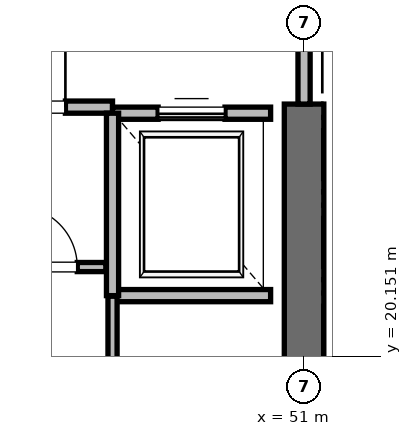
"""IFC4 building model, lengths in metres.
Left out: names, types, materials, properties, quantities, classifications, styles, units other than length and angle.
Written with IfcOpenShell. Run it as: python <this file> out.ifc"""

import sys

from ifc_helpers import new_model, si_unit, direction, frame, frame_2d, origin, place, context, subcontext, project, spatial, rectangle, extrude, element, fill, save


model = new_model("IFC4")
c1 = context("Model", 3, precision=1e-05, world=origin(), true_north=direction((0.0, 1.0)))
c2 = subcontext(c1, "Body", "Model", "MODEL_VIEW")
j1 = project(units=[si_unit("LENGTHUNIT", "METRE"), si_unit("PLANEANGLEUNIT", "RADIAN")], contexts=[c1])
p1 = place(None, origin())
s1 = spatial("IfcSite", under=j1, at=p1, CompositionType="ELEMENT")
p2 = place(p1, origin())
s2 = spatial("IfcBuilding", under=s1, at=p2, CompositionType="ELEMENT")
p3 = place(p2, frame((0.0, 0.0, 99.6)))
s3 = spatial("IfcBuildingStorey", under=s2, at=p3, CompositionType="ELEMENT", Elevation=99.6)
p4 = place(p3, frame((51.0, 18.5, 0.0), z_axis=(0.0, 0.0, 1.0), x_axis=(0.0, 1.0, 0.0)))
e1 = element("IfcWall", 1, at=p4, inside=s3, PredefinedType="SHEAR", context=c2, shape_type="SweptSolid", body=[
    extrude(rectangle(XDim=5.8, YDim=0.65, at=frame_2d((2.9, 0.0))), origin(), (0.0, 0.0, 1.0), 3.76),
])
p5 = place(p3, frame((45.15, 24.25, 0.0), z_axis=(0.0, 0.0, 1.0), x_axis=(1.0, 0.0, 0.0)))
e2 = element("IfcWall", 2, at=p5, inside=s3, PredefinedType="PARTITIONING", context=c2, shape_type="SweptSolid", body=[
    extrude(rectangle(XDim=2.7, YDim=0.2, at=frame_2d((1.35, 0.0))), origin(), (0.0, 0.0, 1.0), 3.76),
])
p6 = place(p5, frame((0.775, 0.0, 0.0)))
e3 = element("IfcOpeningElement", 3, at=p6, cuts=e2, PredefinedType="OPENING", context=c2, shape_type="SweptSolid", body=[
    extrude(rectangle(XDim=1.15, YDim=2.2, at=frame_2d((0.575, 1.1))), frame((0.0, 0.1, 0.0), z_axis=(0.0, -1.0, 0.0), x_axis=(1.0, 0.0, 0.0)), (0.0, 0.0, 1.0), 0.2),
])
p7 = place(p3, frame((51.0, 24.3, 0.0), z_axis=(0.0, 0.0, 1.0), x_axis=(0.0, 1.0, 0.0)))
e4 = element("IfcWall", 4, at=p7, inside=s3, PredefinedType="PARTITIONING", context=c2, shape_type="SweptSolid", body=[
    extrude(rectangle(XDim=3.4, YDim=0.2, at=frame_2d((1.7, 0.0))), origin(), (0.0, 0.0, 1.0), 2.54),
])
p8 = place(p7, frame((1.125, 0.0, 0.0)))
e5 = element("IfcOpeningElement", 5, at=p8, cuts=e4, PredefinedType="OPENING", context=c2, shape_type="SweptSolid", body=[
    extrude(rectangle(XDim=1.15, YDim=2.2, at=frame_2d((0.575, 1.1))), frame((0.0, 0.1, 0.0), z_axis=(0.0, -1.0, 0.0), x_axis=(1.0, 0.0, 0.0)), (0.0, 0.0, 1.0), 0.2),
])
p9 = place(p3, frame((47.85, 21.15, 0.0), z_axis=(0.0, 0.0, 1.0), x_axis=(1.0, 0.0, 0.0)))
e6 = element("IfcWall", 6, at=p9, inside=s3, PredefinedType="SOLIDWALL", context=c2, shape_type="SweptSolid", body=[
    extrude(rectangle(XDim=2.6, YDim=0.2, at=frame_2d((1.3, 0.0))), origin(), (0.0, 0.0, 1.0), 3.76),
])
p10 = place(p3, frame((50.45, 24.15, 0.0), z_axis=(0.0, 0.0, 1.0), x_axis=(-1.0, 0.0, 0.0)))
e7 = element("IfcWall", 7, at=p10, inside=s3, PredefinedType="SOLIDWALL", context=c2, shape_type="SweptSolid", body=[
    extrude(rectangle(XDim=2.6, YDim=0.2, at=frame_2d((1.3, 0.0))), origin(), (0.0, 0.0, 1.0), 2.54),
])
p11 = place(p10, frame((0.75, 0.0, 0.0)))
e8 = element("IfcOpeningElement", 8, at=p11, cuts=e7, PredefinedType="OPENING", context=c2, shape_type="SweptSolid", body=[
    extrude(rectangle(XDim=1.1, YDim=2.2, at=frame_2d((0.55, 1.1))), frame((0.0, 0.1, 0.0), z_axis=(0.0, -1.0, 0.0), x_axis=(1.0, 0.0, 0.0)), (0.0, 0.0, 1.0), 0.2),
])
p12 = place(p3, frame((47.85, 24.15, 0.0), z_axis=(0.0, 0.0, 1.0), x_axis=(0.0, -1.0, 0.0)))
e9 = element("IfcWall", 9, at=p12, inside=s3, PredefinedType="SOLIDWALL", context=c2, shape_type="SweptSolid", body=[
    extrude(rectangle(XDim=3.0, YDim=0.2, at=frame_2d((1.5, 0.0))), origin(), (0.0, 0.0, 1.0), 3.76),
])
p13 = place(p3, frame((47.85, 18.6, 0.0), z_axis=(0.0, 0.0, 1.0), x_axis=(0.0, 1.0, 0.0)))
e10 = element("IfcWall", 10, at=p13, inside=s3, PredefinedType="PARTITIONING", context=c2, shape_type="SweptSolid", body=[
    extrude(rectangle(XDim=2.54, YDim=0.15, at=frame_2d((1.27, 0.0))), origin(), (0.0, 0.0, 1.0), 2.85),
])
p14 = place(p3, frame((45.8, 21.62, 0.0), z_axis=(0.0, 0.0, 1.0), x_axis=(1.0, 0.0, 0.0)))
e11 = element("IfcWall", 11, at=p14, inside=s3, PredefinedType="PARTITIONING", context=c2, shape_type="SweptSolid", body=[
    extrude(rectangle(XDim=1.94, YDim=0.15, at=frame_2d((0.97, 0.0))), origin(), (0.0, 0.0, 1.0), 2.85),
])
p15 = place(p14, frame((0.47, 0.0, 0.0)))
e12 = element("IfcOpeningElement", 12, at=p15, cuts=e11, PredefinedType="OPENING", context=c2, shape_type="SweptSolid", body=[
    extrude(rectangle(XDim=1.0, YDim=2.15, at=frame_2d((0.5, 1.075))), frame((0.0, 0.075, 0.0), z_axis=(0.0, -1.0, 0.0), x_axis=(1.0, 0.0, 0.0)), (0.0, 0.0, 1.0), 0.15),
])
p16 = place(p6, origin())
e13 = element("IfcDoor", 13, at=p16, inside=s3, OperationType="SINGLE_SWING_RIGHT", PredefinedType="DOOR", context=c2, shape_type="SweptSolid", body=[
    extrude(rectangle(XDim=1.15, YDim=2.2, at=frame_2d((0.575, 1.1))), frame((0.0, 0.025, 0.0), z_axis=(0.0, -1.0, 0.0), x_axis=(1.0, 0.0, 0.0)), (0.0, 0.0, 1.0), 0.05),
])
fill(e3, e13)
p17 = place(p11, origin())
e14 = element("IfcDoor", 14, at=p17, inside=s3, OperationType="SLIDING_TO_RIGHT", PredefinedType="DOOR", context=c2, shape_type="SweptSolid", body=[
    extrude(rectangle(XDim=1.1, YDim=2.2, at=frame_2d((0.55, 1.1))), frame((0.0, 0.025, 0.0), z_axis=(0.0, -1.0, 0.0), x_axis=(1.0, 0.0, 0.0)), (0.0, 0.0, 1.0), 0.05),
])
fill(e8, e14)
p18 = place(p15, origin())
e15 = element("IfcDoor", 15, at=p18, inside=s3, OperationType="SINGLE_SWING_LEFT", PredefinedType="DOOR", context=c2, shape_type="SweptSolid", body=[
    extrude(rectangle(XDim=1.0, YDim=2.15, at=frame_2d((0.5, 1.075))), frame((0.0, 0.025, 0.0), z_axis=(0.0, -1.0, 0.0), x_axis=(1.0, 0.0, 0.0)), (0.0, 0.0, 1.0), 0.05),
])
fill(e12, e15)
save(model, sys.argv[1])
